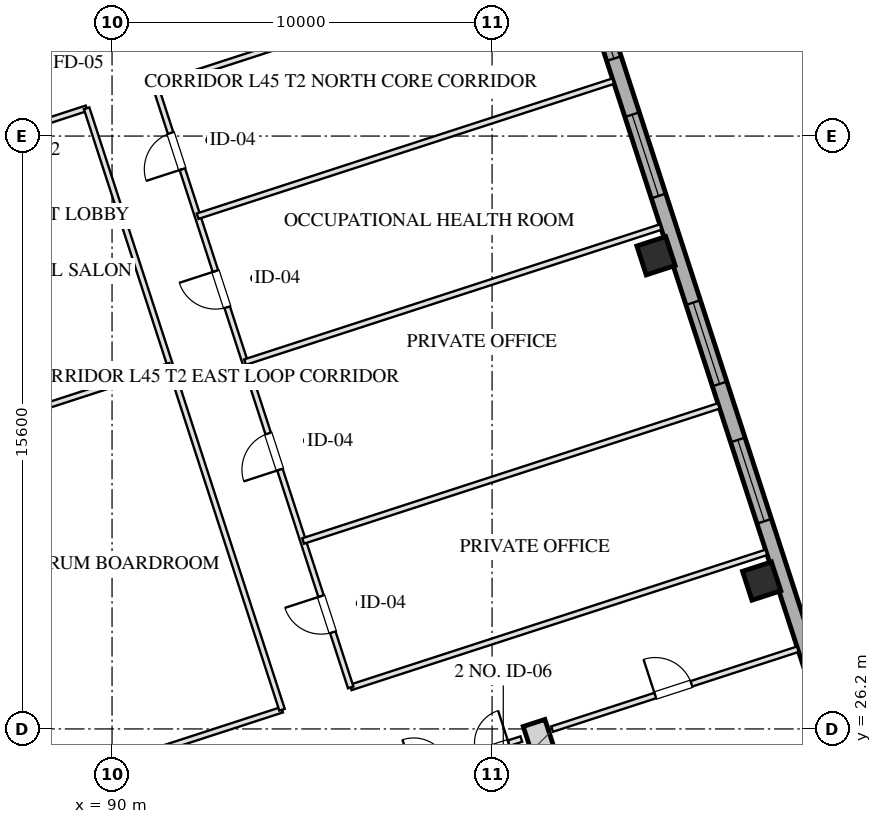
"""IFC4 building model, lengths in metres.
Left out: names, types, materials, properties, quantities, classifications, styles, units other than length and angle.
Written with IfcOpenShell. Run it as: python <this file> out.ifc"""

import sys

from ifc_helpers import new_model, si_unit, direction, frame, frame_2d, origin, origin_2d, place, context, subcontext, project, spatial, rectangle, hollow_rectangle, extrude, element, fill, save


model = new_model("IFC4")
c1 = context("Model", 3, precision=1e-05, world=origin(), true_north=direction((0.0, 1.0)))
c2 = subcontext(c1, "Body", "Model", "MODEL_VIEW")
j1 = project(units=[si_unit("LENGTHUNIT", "METRE"), si_unit("PLANEANGLEUNIT", "RADIAN")], contexts=[c1])
p1 = place(None, origin())
s1 = spatial("IfcSite", under=j1, at=p1, CompositionType="ELEMENT")
p2 = place(p1, origin())
s2 = spatial("IfcBuilding", under=s1, at=p2, CompositionType="ELEMENT")
p3 = place(p2, frame((0.0, 0.0, 170.2)))
s3 = spatial("IfcBuildingStorey", under=s2, at=p3, CompositionType="ELEMENT", Elevation=170.2)
p4 = place(p3, frame((101.105, 26.358, 0.0), z_axis=(0.0, 0.0, 1.0), x_axis=(0.309010370028, -0.95105866865, 0.0)))
e1 = element("IfcWall", 1, at=p4, inside=s3, PredefinedType="SHEAR", context=c2, shape_type="SweptSolid", body=[
    extrude(rectangle(XDim=9.48, YDim=0.6, at=frame_2d((4.74, 0.0))), origin(), (0.0, 0.0, 1.0), 3.45),
])
for number, where, z_axis, x_axis in (
    (2, (107.094, 30.091, 0.0), (0.0, 0.0, 1.0), (0.951, 0.309, 0.0)),
    (3, (104.313, 38.651, 0.0), (0.0, 0.0, 1.0), (0.951, 0.309, 0.0)),
):
    element("IfcColumn", number, at=place(p3, frame(where, z_axis=z_axis, x_axis=x_axis)), inside=s3, PredefinedType="COLUMN", context=c2, shape_type="SweptSolid", body=[
        extrude(hollow_rectangle(XDim=0.8, YDim=0.8, WallThickness=0.028, at=origin_2d()), origin(), (0.0, 0.0, 1.0), 3.451),
    ])
p5 = place(p3, frame((98.224, 59.173, 0.0), z_axis=(0.0, 0.0, 1.0), x_axis=(0.309014228706, -0.951057414911, 0.0)))
e4 = element("IfcWall", 4, at=p5, inside=s3, PredefinedType="SOLIDWALL", context=c2, shape_type="SweptSolid", body=[
    extrude(rectangle(XDim=42.8, YDim=0.4, at=frame_2d((21.4, 0.0))), origin(), (0.0, 0.0, 1.0), 2.61),
])
p6 = place(p5, frame((26.675, 0.0, 0.75)))
e5 = element("IfcOpeningElement", 5, at=p6, cuts=e4, PredefinedType="OPENING", context=c2, shape_type="SweptSolid", body=[
    extrude(rectangle(XDim=2.25, YDim=1.46, at=frame_2d((1.125, 0.73))), frame((0.0, 0.21, 0.0), z_axis=(0.0, -1.0, 0.0), x_axis=(1.0, 0.0, 0.0)), (0.0, 0.0, 1.0), 0.42),
])
p7 = place(p5, frame((22.875, 0.0, 0.75)))
e6 = element("IfcOpeningElement", 6, at=p7, cuts=e4, PredefinedType="OPENING", context=c2, shape_type="SweptSolid", body=[
    extrude(rectangle(XDim=2.25, YDim=1.46, at=frame_2d((1.125, 0.73))), frame((0.0, 0.21, 0.0), z_axis=(0.0, -1.0, 0.0), x_axis=(1.0, 0.0, 0.0)), (0.0, 0.0, 1.0), 0.42),
])
p8 = place(p5, frame((17.675, 0.0, 0.75)))
e7 = element("IfcOpeningElement", 7, at=p8, cuts=e4, PredefinedType="OPENING", context=c2, shape_type="SweptSolid", body=[
    extrude(rectangle(XDim=2.25, YDim=1.46, at=frame_2d((1.125, 0.73))), frame((0.0, 0.21, 0.0), z_axis=(0.0, -1.0, 0.0), x_axis=(1.0, 0.0, 0.0)), (0.0, 0.0, 1.0), 0.42),
])
p9 = place(p5, frame((13.875, 0.0, 0.75)))
e8 = element("IfcOpeningElement", 8, at=p9, cuts=e4, PredefinedType="OPENING", context=c2, shape_type="SweptSolid", body=[
    extrude(rectangle(XDim=2.25, YDim=1.46, at=frame_2d((1.125, 0.73))), frame((0.0, 0.21, 0.0), z_axis=(0.0, -1.0, 0.0), x_axis=(1.0, 0.0, 0.0)), (0.0, 0.0, 1.0), 0.42),
])
p10 = place(p3, frame((97.727, 24.944, 0.0), z_axis=(0.0, 0.0, 1.0), x_axis=(0.951036872128, 0.309077446369, 0.0)))
e9 = element("IfcWall", 9, at=p10, inside=s3, PredefinedType="PARTITIONING", context=c2, shape_type="SweptSolid", body=[
    extrude(rectangle(XDim=3.2, YDim=0.15, at=frame_2d((1.6, 0.0))), origin(), (0.0, 0.0, 1.0), 3.175),
])
p11 = place(p10, frame((0.22, 0.0, 0.0)))
e10 = element("IfcOpeningElement", 10, at=p11, cuts=e9, PredefinedType="OPENING", context=c2, shape_type="SweptSolid", body=[
    extrude(rectangle(XDim=0.95, YDim=2.05, at=frame_2d((0.475, 1.025))), frame((0.0, 0.085, 0.0), z_axis=(0.0, -1.0, 0.0), x_axis=(1.0, 0.0, 0.0)), (0.0, 0.0, 1.0), 0.17),
])
p12 = place(p10, frame((1.95, 0.0, 0.0)))
e11 = element("IfcOpeningElement", 11, at=p12, cuts=e9, PredefinedType="OPENING", context=c2, shape_type="SweptSolid", body=[
    extrude(rectangle(XDim=0.9, YDim=2.05, at=frame_2d((0.45, 1.025))), frame((0.0, 0.085, 0.0), z_axis=(0.0, -1.0, 0.0), x_axis=(1.0, 0.0, 0.0)), (0.0, 0.0, 1.0), 0.17),
])
p13 = place(p3, frame((101.578, 26.196, 0.0), z_axis=(0.0, 0.0, 1.0), x_axis=(0.951064934653, 0.308991084134, 0.0)))
e12 = element("IfcWall", 12, at=p13, inside=s3, PredefinedType="PARTITIONING", context=c2, shape_type="SweptSolid", body=[
    extrude(rectangle(XDim=6.8, YDim=0.15, at=frame_2d((3.4, 0.0))), origin(), (0.0, 0.0, 1.0), 3.175),
])
p14 = place(p13, frame((2.856, 0.0, 0.0)))
e13 = element("IfcOpeningElement", 13, at=p14, cuts=e12, PredefinedType="OPENING", context=c2, shape_type="SweptSolid", body=[
    extrude(rectangle(XDim=1.0, YDim=2.05, at=frame_2d((0.5, 1.025))), frame((0.0, 0.085, 0.0), z_axis=(0.0, -1.0, 0.0), x_axis=(1.0, 0.0, 0.0)), (0.0, 0.0, 1.0), 0.17),
])
p15 = place(p3, frame((86.294, 24.048, 0.0), z_axis=(0.0, 0.0, 1.0), x_axis=(0.951052008164, 0.309030868631, 0.0)))
e14 = element("IfcWall", 14, at=p15, inside=s3, PredefinedType="PARTITIONING", context=c2, shape_type="SweptSolid", body=[
    extrude(rectangle(XDim=8.6, YDim=0.15, at=frame_2d((4.3, 0.0))), origin(), (0.0, 0.0, 1.0), 3.175),
])
p16 = place(p3, frame((96.28, 27.292, 0.0), z_axis=(0.0, 0.0, 1.0), x_axis=(0.951056999652, 0.309015506751, 0.0)))
e15 = element("IfcWall", 15, at=p16, inside=s3, PredefinedType="PARTITIONING", context=c2, shape_type="SweptSolid", body=[
    extrude(rectangle(XDim=11.5, YDim=0.15, at=frame_2d((5.75, 0.0))), origin(), (0.0, 0.0, 1.0), 3.175),
])
p17 = place(p3, frame((81.152, 39.873, 0.0), z_axis=(0.0, 0.0, 1.0), x_axis=(0.951057640494, 0.309013534425, 0.0)))
e16 = element("IfcWall", 16, at=p17, inside=s3, PredefinedType="PARTITIONING", context=c2, shape_type="SweptSolid", body=[
    extrude(rectangle(XDim=8.6, YDim=0.15, at=frame_2d((4.3, 0.0))), origin(), (0.0, 0.0, 1.0), 3.175),
])
p18 = place(p3, frame((91.138, 43.118, 0.0), z_axis=(0.0, 0.0, 1.0), x_axis=(0.951054972381, 0.309021746015, 0.0)))
e17 = element("IfcWall", 17, at=p18, inside=s3, PredefinedType="PARTITIONING", context=c2, shape_type="SweptSolid", body=[
    extrude(rectangle(XDim=11.5, YDim=0.15, at=frame_2d((5.75, 0.0))), origin(), (0.0, 0.0, 1.0), 3.175),
])
p19 = place(p3, frame((94.473, 26.705, 0.0), z_axis=(0.0, 0.0, 1.0), x_axis=(-0.309022042254, 0.951054876125, 0.0)))
e18 = element("IfcWall", 18, at=p19, inside=s3, PredefinedType="PARTITIONING", context=c2, shape_type="SweptSolid", body=[
    extrude(rectangle(XDim=16.64, YDim=0.15, at=frame_2d((8.32, 0.0))), origin(), (0.0, 0.0, 1.0), 3.175),
])
p20 = place(p3, frame((96.28, 27.292, 0.0), z_axis=(0.0, 0.0, 1.0), x_axis=(-0.309008771245, 0.951059188113, 0.0)))
e19 = element("IfcWall", 19, at=p20, inside=s3, PredefinedType="PARTITIONING", context=c2, shape_type="SweptSolid", body=[
    extrude(rectangle(XDim=16.64, YDim=0.15, at=frame_2d((8.32, 0.0))), origin(), (0.0, 0.0, 1.0), 3.175),
])
p21 = place(p20, frame((1.526, 0.0, 0.0)))
e20 = element("IfcOpeningElement", 20, at=p21, cuts=e19, PredefinedType="OPENING", context=c2, shape_type="SweptSolid", body=[
    extrude(rectangle(XDim=1.0, YDim=2.05, at=frame_2d((0.5, 1.025))), frame((0.0, 0.085, 0.0), z_axis=(0.0, -1.0, 0.0), x_axis=(1.0, 0.0, 0.0)), (0.0, 0.0, 1.0), 0.17),
])
p22 = place(p20, frame((6.026, 0.0, 0.0)))
e21 = element("IfcOpeningElement", 21, at=p22, cuts=e19, PredefinedType="OPENING", context=c2, shape_type="SweptSolid", body=[
    extrude(rectangle(XDim=1.0, YDim=2.05, at=frame_2d((0.5, 1.025))), frame((0.0, 0.085, 0.0), z_axis=(0.0, -1.0, 0.0), x_axis=(1.0, 0.0, 0.0)), (0.0, 0.0, 1.0), 0.17),
])
p23 = place(p20, frame((10.519, 0.0, 0.0)))
e22 = element("IfcOpeningElement", 22, at=p23, cuts=e19, PredefinedType="OPENING", context=c2, shape_type="SweptSolid", body=[
    extrude(rectangle(XDim=1.0, YDim=2.05, at=frame_2d((0.5, 1.025))), frame((0.0, 0.085, 0.0), z_axis=(0.0, -1.0, 0.0), x_axis=(1.0, 0.0, 0.0)), (0.0, 0.0, 1.0), 0.17),
])
p24 = place(p20, frame((14.338, 0.0, 0.0)))
e23 = element("IfcOpeningElement", 23, at=p24, cuts=e19, PredefinedType="OPENING", context=c2, shape_type="SweptSolid", body=[
    extrude(rectangle(XDim=1.0, YDim=2.05, at=frame_2d((0.5, 1.025))), frame((0.0, 0.085, 0.0), z_axis=(0.0, -1.0, 0.0), x_axis=(1.0, 0.0, 0.0)), (0.0, 0.0, 1.0), 0.17),
])
p25 = place(p3, frame((83.352, 33.102, 0.0), z_axis=(0.0, 0.0, 1.0), x_axis=(0.951057640494, 0.309013534425, 0.0)))
e24 = element("IfcWall", 24, at=p25, inside=s3, PredefinedType="PARTITIONING", context=c2, shape_type="SweptSolid", body=[
    extrude(rectangle(XDim=8.6, YDim=0.15, at=frame_2d((4.3, 0.0))), origin(), (0.0, 0.0, 1.0), 3.175),
])
p26 = place(p3, frame((95.028, 31.146, 0.0), z_axis=(0.0, 0.0, 1.0), x_axis=(0.951056999652, 0.309015506751, 0.0)))
e25 = element("IfcWall", 25, at=p26, inside=s3, PredefinedType="PARTITIONING", context=c2, shape_type="SweptSolid", body=[
    extrude(rectangle(XDim=11.5, YDim=0.15, at=frame_2d((5.75, 0.0))), origin(), (0.0, 0.0, 1.0), 3.175),
])
p27 = place(p3, frame((93.499, 35.852, 0.0), z_axis=(0.0, 0.0, 1.0), x_axis=(0.951054972381, 0.309021746015, 0.0)))
e26 = element("IfcWall", 26, at=p27, inside=s3, PredefinedType="PARTITIONING", context=c2, shape_type="SweptSolid", body=[
    extrude(rectangle(XDim=11.5, YDim=0.15, at=frame_2d((5.75, 0.0))), origin(), (0.0, 0.0, 1.0), 3.175),
])
p28 = place(p3, frame((92.251, 39.691, 0.0), z_axis=(0.0, 0.0, 1.0), x_axis=(0.951063238644, 0.308996304347, 0.0)))
e27 = element("IfcWall", 27, at=p28, inside=s3, PredefinedType="PARTITIONING", context=c2, shape_type="SweptSolid", body=[
    extrude(rectangle(XDim=11.5, YDim=0.15, at=frame_2d((5.75, 0.0))), origin(), (0.0, 0.0, 1.0), 3.175),
])
p29 = place(p6, origin())
e28 = element("IfcWindow", 28, at=p29, inside=s3, PartitioningType="TRIPLE_PANEL_VERTICAL", PredefinedType="WINDOW", context=c2, shape_type="SweptSolid", body=[
    extrude(rectangle(XDim=2.25, YDim=1.46, at=frame_2d((1.125, 0.73))), frame((0.0, 0.03, 0.0), z_axis=(0.0, -1.0, 0.0), x_axis=(1.0, 0.0, 0.0)), (0.0, 0.0, 1.0), 0.06),
])
fill(e5, e28)
p30 = place(p7, origin())
e29 = element("IfcWindow", 29, at=p30, inside=s3, PartitioningType="TRIPLE_PANEL_VERTICAL", PredefinedType="WINDOW", context=c2, shape_type="SweptSolid", body=[
    extrude(rectangle(XDim=2.25, YDim=1.46, at=frame_2d((1.125, 0.73))), frame((0.0, 0.03, 0.0), z_axis=(0.0, -1.0, 0.0), x_axis=(1.0, 0.0, 0.0)), (0.0, 0.0, 1.0), 0.06),
])
fill(e6, e29)
p31 = place(p8, origin())
e30 = element("IfcWindow", 30, at=p31, inside=s3, PartitioningType="TRIPLE_PANEL_VERTICAL", PredefinedType="WINDOW", context=c2, shape_type="SweptSolid", body=[
    extrude(rectangle(XDim=2.25, YDim=1.46, at=frame_2d((1.125, 0.73))), frame((0.0, 0.03, 0.0), z_axis=(0.0, -1.0, 0.0), x_axis=(1.0, 0.0, 0.0)), (0.0, 0.0, 1.0), 0.06),
])
fill(e7, e30)
p32 = place(p9, origin())
e31 = element("IfcWindow", 31, at=p32, inside=s3, PartitioningType="TRIPLE_PANEL_VERTICAL", PredefinedType="WINDOW", context=c2, shape_type="SweptSolid", body=[
    extrude(rectangle(XDim=2.25, YDim=1.46, at=frame_2d((1.125, 0.73))), frame((0.0, 0.03, 0.0), z_axis=(0.0, -1.0, 0.0), x_axis=(1.0, 0.0, 0.0)), (0.0, 0.0, 1.0), 0.06),
])
fill(e8, e31)
p33 = place(p12, origin())
e32 = element("IfcDoor", 32, at=p33, inside=s3, OperationType="SINGLE_SWING_RIGHT", PredefinedType="DOOR", context=c2, shape_type="SweptSolid", body=[
    extrude(rectangle(XDim=0.9, YDim=2.05, at=frame_2d((0.45, 1.025))), frame((0.0, 0.025, 0.0), z_axis=(0.0, -1.0, 0.0), x_axis=(1.0, 0.0, 0.0)), (0.0, 0.0, 1.0), 0.05),
])
fill(e11, e32)
p34 = place(p14, origin())
e33 = element("IfcDoor", 33, at=p34, inside=s3, OperationType="SINGLE_SWING_LEFT", PredefinedType="DOOR", context=c2, shape_type="SweptSolid", body=[
    extrude(rectangle(XDim=1.0, YDim=2.05, at=frame_2d((0.5, 1.025))), frame((0.0, 0.025, 0.0), z_axis=(0.0, -1.0, 0.0), x_axis=(1.0, 0.0, 0.0)), (0.0, 0.0, 1.0), 0.05),
])
fill(e13, e33)
p35 = place(p21, origin())
e34 = element("IfcDoor", 34, at=p35, inside=s3, OperationType="SINGLE_SWING_RIGHT", PredefinedType="DOOR", context=c2, shape_type="SweptSolid", body=[
    extrude(rectangle(XDim=1.0, YDim=2.05, at=frame_2d((0.5, 1.025))), frame((0.0, 0.025, 0.0), z_axis=(0.0, -1.0, 0.0), x_axis=(1.0, 0.0, 0.0)), (0.0, 0.0, 1.0), 0.05),
])
fill(e20, e34)
p36 = place(p22, origin())
e35 = element("IfcDoor", 35, at=p36, inside=s3, OperationType="SINGLE_SWING_LEFT", PredefinedType="DOOR", context=c2, shape_type="SweptSolid", body=[
    extrude(rectangle(XDim=1.0, YDim=2.05, at=frame_2d((0.5, 1.025))), frame((0.0, 0.025, 0.0), z_axis=(0.0, -1.0, 0.0), x_axis=(1.0, 0.0, 0.0)), (0.0, 0.0, 1.0), 0.05),
])
fill(e21, e35)
p37 = place(p23, origin())
e36 = element("IfcDoor", 36, at=p37, inside=s3, OperationType="SINGLE_SWING_RIGHT", PredefinedType="DOOR", context=c2, shape_type="SweptSolid", body=[
    extrude(rectangle(XDim=1.0, YDim=2.05, at=frame_2d((0.5, 1.025))), frame((0.0, 0.025, 0.0), z_axis=(0.0, -1.0, 0.0), x_axis=(1.0, 0.0, 0.0)), (0.0, 0.0, 1.0), 0.05),
])
fill(e22, e36)
p38 = place(p24, origin())
e37 = element("IfcDoor", 37, at=p38, inside=s3, OperationType="SINGLE_SWING_LEFT", PredefinedType="DOOR", context=c2, shape_type="SweptSolid", body=[
    extrude(rectangle(XDim=1.0, YDim=2.05, at=frame_2d((0.5, 1.025))), frame((0.0, 0.025, 0.0), z_axis=(0.0, -1.0, 0.0), x_axis=(1.0, 0.0, 0.0)), (0.0, 0.0, 1.0), 0.05),
])
fill(e23, e37)
save(model, sys.argv[1])
